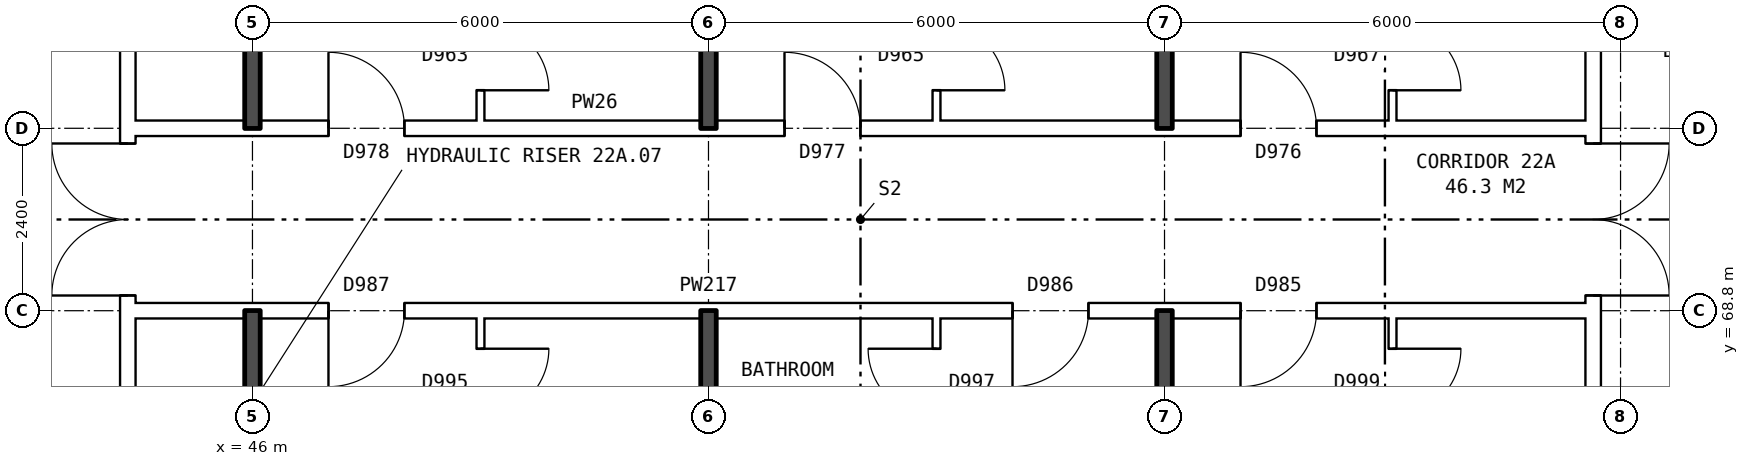
"""IFC4 building model, lengths in metres.
Left out: names, types, materials, properties, quantities, classifications, styles, units other than length and angle.
Written with IfcOpenShell. Run it as: python <this file> out.ifc"""

import sys

from ifc_helpers import new_model, si_unit, direction, frame, frame_2d, origin, place, context, subcontext, project, spatial, rectangle, extrude, element, fill, save


model = new_model("IFC4")
c1 = context("Model", 3, precision=1e-05, world=origin(), true_north=direction((0.0, 1.0)))
c2 = subcontext(c1, "Body", "Model", "MODEL_VIEW")
j1 = project(units=[si_unit("LENGTHUNIT", "METRE"), si_unit("PLANEANGLEUNIT", "RADIAN")], contexts=[c1])
p1 = place(None, origin())
s1 = spatial("IfcSite", under=j1, at=p1, CompositionType="ELEMENT")
p2 = place(p1, origin())
s2 = spatial("IfcBuilding", under=s1, at=p2, CompositionType="ELEMENT")
p3 = place(p2, frame((0.0, 0.0, 80.9)))
s3 = spatial("IfcBuildingStorey", under=s2, at=p3, CompositionType="ELEMENT", Elevation=80.9)
p4 = place(p3, frame((63.64, 63.9, 0.0), z_axis=(0.0, 0.0, 1.0), x_axis=(0.0, 1.0, 0.0)))
e1 = element("IfcWall", 1, at=p4, inside=s3, PredefinedType="PARTITIONING", context=c2, shape_type="SweptSolid", body=[
    extrude(rectangle(XDim=12.2, YDim=0.2, at=frame_2d((6.1, 0.0))), origin(), (0.0, 0.0, 1.0), 2.85),
])
p5 = place(p4, frame((5.1, 0.0, 0.0)))
e2 = element("IfcOpeningElement", 2, at=p5, cuts=e1, PredefinedType="OPENING", context=c2, shape_type="SweptSolid", body=[
    extrude(rectangle(XDim=2.0, YDim=2.1, at=frame_2d((1.0, 1.05))), frame((0.0, 0.11, 0.0), z_axis=(0.0, -1.0, 0.0), x_axis=(1.0, 0.0, 0.0)), (0.0, 0.0, 1.0), 0.22),
])
p6 = place(p3, frame((44.36, 63.9, 0.0), z_axis=(0.0, 0.0, 1.0), x_axis=(0.0, 1.0, 0.0)))
e3 = element("IfcWall", 3, at=p6, inside=s3, PredefinedType="PARTITIONING", context=c2, shape_type="SweptSolid", body=[
    extrude(rectangle(XDim=12.2, YDim=0.2, at=frame_2d((6.1, 0.0))), origin(), (0.0, 0.0, 1.0), 2.85),
])
p7 = place(p6, frame((5.1, 0.0, 0.0)))
e4 = element("IfcOpeningElement", 4, at=p7, cuts=e3, PredefinedType="OPENING", context=c2, shape_type="SweptSolid", body=[
    extrude(rectangle(XDim=2.0, YDim=2.1, at=frame_2d((1.0, 1.05))), frame((0.0, 0.11, 0.0), z_axis=(0.0, -1.0, 0.0), x_axis=(1.0, 0.0, 0.0)), (0.0, 0.0, 1.0), 0.22),
])
p8 = place(p3, frame((44.36, 68.8, 0.0), z_axis=(0.0, 0.0, 1.0), x_axis=(1.0, 0.0, 0.0)))
e5 = element("IfcWall", 5, at=p8, inside=s3, PredefinedType="PARTITIONING", context=c2, shape_type="SweptSolid", body=[
    extrude(rectangle(XDim=19.28, YDim=0.2, at=frame_2d((9.64, 0.0))), origin(), (0.0, 0.0, 1.0), 2.85),
])
p9 = place(p8, frame((14.64, 0.0, 0.0)))
e6 = element("IfcOpeningElement", 6, at=p9, cuts=e5, PredefinedType="OPENING", context=c2, shape_type="SweptSolid", body=[
    extrude(rectangle(XDim=1.0, YDim=2.1, at=frame_2d((0.5, 1.05))), frame((0.0, 0.11, 0.0), z_axis=(0.0, -1.0, 0.0), x_axis=(1.0, 0.0, 0.0)), (0.0, 0.0, 1.0), 0.22),
])
p10 = place(p8, frame((11.64, 0.0, 0.0)))
e7 = element("IfcOpeningElement", 7, at=p10, cuts=e5, PredefinedType="OPENING", context=c2, shape_type="SweptSolid", body=[
    extrude(rectangle(XDim=1.0, YDim=2.1, at=frame_2d((0.5, 1.05))), frame((0.0, 0.11, 0.0), z_axis=(0.0, -1.0, 0.0), x_axis=(1.0, 0.0, 0.0)), (0.0, 0.0, 1.0), 0.22),
])
p11 = place(p8, frame((2.64, 0.0, 0.0)))
e8 = element("IfcOpeningElement", 8, at=p11, cuts=e5, PredefinedType="OPENING", context=c2, shape_type="SweptSolid", body=[
    extrude(rectangle(XDim=1.0, YDim=2.1, at=frame_2d((0.5, 1.05))), frame((0.0, 0.11, 0.0), z_axis=(0.0, -1.0, 0.0), x_axis=(1.0, 0.0, 0.0)), (0.0, 0.0, 1.0), 0.22),
])
p12 = place(p3, frame((44.36, 71.2, 0.0), z_axis=(0.0, 0.0, 1.0), x_axis=(1.0, 0.0, 0.0)))
e9 = element("IfcWall", 9, at=p12, inside=s3, PredefinedType="PARTITIONING", context=c2, shape_type="SweptSolid", body=[
    extrude(rectangle(XDim=19.28, YDim=0.2, at=frame_2d((9.64, 0.0))), origin(), (0.0, 0.0, 1.0), 2.85),
])
p13 = place(p12, frame((14.64, 0.0, 0.0)))
e10 = element("IfcOpeningElement", 10, at=p13, cuts=e9, PredefinedType="OPENING", context=c2, shape_type="SweptSolid", body=[
    extrude(rectangle(XDim=1.0, YDim=2.1, at=frame_2d((0.5, 1.05))), frame((0.0, 0.11, 0.0), z_axis=(0.0, -1.0, 0.0), x_axis=(1.0, 0.0, 0.0)), (0.0, 0.0, 1.0), 0.22),
])
p14 = place(p12, frame((8.64, 0.0, 0.0)))
e11 = element("IfcOpeningElement", 11, at=p14, cuts=e9, PredefinedType="OPENING", context=c2, shape_type="SweptSolid", body=[
    extrude(rectangle(XDim=1.0, YDim=2.1, at=frame_2d((0.5, 1.05))), frame((0.0, 0.11, 0.0), z_axis=(0.0, -1.0, 0.0), x_axis=(1.0, 0.0, 0.0)), (0.0, 0.0, 1.0), 0.22),
])
p15 = place(p12, frame((2.64, 0.0, 0.0)))
e12 = element("IfcOpeningElement", 12, at=p15, cuts=e9, PredefinedType="OPENING", context=c2, shape_type="SweptSolid", body=[
    extrude(rectangle(XDim=1.0, YDim=2.1, at=frame_2d((0.5, 1.05))), frame((0.0, 0.11, 0.0), z_axis=(0.0, -1.0, 0.0), x_axis=(1.0, 0.0, 0.0)), (0.0, 0.0, 1.0), 0.22),
])
for number, where, z_axis, x_axis in (
    (13, (46.0, 63.8, 0.0), (0.0, 0.0, 1.0), (0.0, 1.0, 0.0)),
    (14, (46.0, 71.2, 0.0), (0.0, 0.0, 1.0), (0.0, 1.0, 0.0)),
):
    element("IfcWall", number, at=place(p3, frame(where, z_axis=z_axis, x_axis=x_axis)), inside=s3, PredefinedType="SOLIDWALL", context=c2, shape_type="SweptSolid", body=[
        extrude(rectangle(XDim=5.0, YDim=0.2, at=frame_2d((2.5, 0.0))), origin(), (0.0, 0.0, 1.0), 2.85),
    ])
p16 = place(p3, frame((49.0, 54.36, 0.0), z_axis=(0.0, 0.0, 1.0), x_axis=(0.0, 1.0, 0.0)))
e15 = element("IfcWall", 15, at=p16, inside=s3, PredefinedType="PARTITIONING", context=c2, shape_type="SweptSolid", body=[
    extrude(rectangle(XDim=14.34, YDim=0.1, at=frame_2d((7.17, 0.0))), origin(), (0.0, 0.0, 1.0), 2.85),
])
p17 = place(p16, frame((5.5, 0.0, 0.0)))
e16 = element("IfcOpeningElement", 16, at=p17, cuts=e15, PredefinedType="OPENING", context=c2, shape_type="SweptSolid", body=[
    extrude(rectangle(XDim=0.9, YDim=2.1, at=frame_2d((0.45, 1.05))), frame((0.0, 0.06, 0.0), z_axis=(0.0, -1.0, 0.0), x_axis=(1.0, 0.0, 0.0)), (0.0, 0.0, 1.0), 0.12),
])
p18 = place(p16, frame((13.04, 0.0, 0.0)))
e17 = element("IfcOpeningElement", 17, at=p18, cuts=e15, PredefinedType="OPENING", context=c2, shape_type="SweptSolid", body=[
    extrude(rectangle(XDim=0.9, YDim=2.1, at=frame_2d((0.45, 1.05))), frame((0.0, 0.06, 0.0), z_axis=(0.0, -1.0, 0.0), x_axis=(1.0, 0.0, 0.0)), (0.0, 0.0, 1.0), 0.12),
])
p19 = place(p3, frame((49.0, 71.3, 0.0), z_axis=(0.0, 0.0, 1.0), x_axis=(0.0, 1.0, 0.0)))
e18 = element("IfcWall", 18, at=p19, inside=s3, PredefinedType="PARTITIONING", context=c2, shape_type="SweptSolid", body=[
    extrude(rectangle(XDim=14.34, YDim=0.1, at=frame_2d((7.17, 0.0))), origin(), (0.0, 0.0, 1.0), 2.85),
])
p20 = place(p19, frame((7.94, 0.0, 0.0)))
e19 = element("IfcOpeningElement", 19, at=p20, cuts=e18, PredefinedType="OPENING", context=c2, shape_type="SweptSolid", body=[
    extrude(rectangle(XDim=0.9, YDim=2.1, at=frame_2d((0.45, 1.05))), frame((0.0, 0.06, 0.0), z_axis=(0.0, -1.0, 0.0), x_axis=(1.0, 0.0, 0.0)), (0.0, 0.0, 1.0), 0.12),
])
p21 = place(p19, frame((0.4, 0.0, 0.0)))
e20 = element("IfcOpeningElement", 20, at=p21, cuts=e18, PredefinedType="OPENING", context=c2, shape_type="SweptSolid", body=[
    extrude(rectangle(XDim=0.9, YDim=2.1, at=frame_2d((0.45, 1.05))), frame((0.0, 0.06, 0.0), z_axis=(0.0, -1.0, 0.0), x_axis=(1.0, 0.0, 0.0)), (0.0, 0.0, 1.0), 0.12),
])
for number, where, z_axis, x_axis in (
    (21, (52.0, 54.36, 0.0), (0.0, 0.0, 1.0), (0.0, 1.0, 0.0)),
    (22, (52.0, 71.2, 0.0), (0.0, 0.0, 1.0), (0.0, 1.0, 0.0)),
):
    element("IfcWall", number, at=place(p3, frame(where, z_axis=z_axis, x_axis=x_axis)), inside=s3, PredefinedType="SOLIDWALL", context=c2, shape_type="SweptSolid", body=[
        extrude(rectangle(XDim=14.44, YDim=0.2, at=frame_2d((7.22, 0.0))), origin(), (0.0, 0.0, 1.0), 2.85),
    ])
p22 = place(p3, frame((55.0, 54.36, 0.0), z_axis=(0.0, 0.0, 1.0), x_axis=(0.0, 1.0, 0.0)))
e23 = element("IfcWall", 23, at=p22, inside=s3, PredefinedType="PARTITIONING", context=c2, shape_type="SweptSolid", body=[
    extrude(rectangle(XDim=14.34, YDim=0.1, at=frame_2d((7.17, 0.0))), origin(), (0.0, 0.0, 1.0), 2.85),
])
p23 = place(p22, frame((6.7, 0.0, 0.0)))
e24 = element("IfcOpeningElement", 24, at=p23, cuts=e23, PredefinedType="OPENING", context=c2, shape_type="SweptSolid", body=[
    extrude(rectangle(XDim=0.9, YDim=2.1, at=frame_2d((0.45, 1.05))), frame((0.0, 0.06, 0.0), z_axis=(0.0, -1.0, 0.0), x_axis=(1.0, 0.0, 0.0)), (0.0, 0.0, 1.0), 0.12),
])
p24 = place(p22, frame((13.04, 0.0, 0.0)))
e25 = element("IfcOpeningElement", 25, at=p24, cuts=e23, PredefinedType="OPENING", context=c2, shape_type="SweptSolid", body=[
    extrude(rectangle(XDim=0.9, YDim=2.1, at=frame_2d((0.45, 1.05))), frame((0.0, 0.06, 0.0), z_axis=(0.0, -1.0, 0.0), x_axis=(1.0, 0.0, 0.0)), (0.0, 0.0, 1.0), 0.12),
])
p25 = place(p3, frame((55.0, 71.3, 0.0), z_axis=(0.0, 0.0, 1.0), x_axis=(0.0, 1.0, 0.0)))
e26 = element("IfcWall", 26, at=p25, inside=s3, PredefinedType="PARTITIONING", context=c2, shape_type="SweptSolid", body=[
    extrude(rectangle(XDim=14.34, YDim=0.1, at=frame_2d((7.17, 0.0))), origin(), (0.0, 0.0, 1.0), 2.85),
])
p26 = place(p25, frame((6.74, 0.0, 0.0)))
e27 = element("IfcOpeningElement", 27, at=p26, cuts=e26, PredefinedType="OPENING", context=c2, shape_type="SweptSolid", body=[
    extrude(rectangle(XDim=0.9, YDim=2.1, at=frame_2d((0.45, 1.05))), frame((0.0, 0.06, 0.0), z_axis=(0.0, -1.0, 0.0), x_axis=(1.0, 0.0, 0.0)), (0.0, 0.0, 1.0), 0.12),
])
p27 = place(p25, frame((0.4, 0.0, 0.0)))
e28 = element("IfcOpeningElement", 28, at=p27, cuts=e26, PredefinedType="OPENING", context=c2, shape_type="SweptSolid", body=[
    extrude(rectangle(XDim=0.9, YDim=2.1, at=frame_2d((0.45, 1.05))), frame((0.0, 0.06, 0.0), z_axis=(0.0, -1.0, 0.0), x_axis=(1.0, 0.0, 0.0)), (0.0, 0.0, 1.0), 0.12),
])
for number, where, z_axis, x_axis in (
    (29, (58.0, 54.36, 0.0), (0.0, 0.0, 1.0), (0.0, 1.0, 0.0)),
    (30, (58.0, 71.2, 0.0), (0.0, 0.0, 1.0), (0.0, 1.0, 0.0)),
):
    element("IfcWall", number, at=place(p3, frame(where, z_axis=z_axis, x_axis=x_axis)), inside=s3, PredefinedType="SOLIDWALL", context=c2, shape_type="SweptSolid", body=[
        extrude(rectangle(XDim=14.44, YDim=0.2, at=frame_2d((7.22, 0.0))), origin(), (0.0, 0.0, 1.0), 2.85),
    ])
p28 = place(p3, frame((61.0, 54.36, 0.0), z_axis=(0.0, 0.0, 1.0), x_axis=(0.0, 1.0, 0.0)))
e31 = element("IfcWall", 31, at=p28, inside=s3, PredefinedType="PARTITIONING", context=c2, shape_type="SweptSolid", body=[
    extrude(rectangle(XDim=14.34, YDim=0.1, at=frame_2d((7.17, 0.0))), origin(), (0.0, 0.0, 1.0), 2.85),
])
p29 = place(p28, frame((7.7, 0.0, 0.0)))
e32 = element("IfcOpeningElement", 32, at=p29, cuts=e31, PredefinedType="OPENING", context=c2, shape_type="SweptSolid", body=[
    extrude(rectangle(XDim=0.9, YDim=2.1, at=frame_2d((0.45, 1.05))), frame((0.0, 0.06, 0.0), z_axis=(0.0, -1.0, 0.0), x_axis=(1.0, 0.0, 0.0)), (0.0, 0.0, 1.0), 0.12),
])
p30 = place(p28, frame((13.04, 0.0, 0.0)))
e33 = element("IfcOpeningElement", 33, at=p30, cuts=e31, PredefinedType="OPENING", context=c2, shape_type="SweptSolid", body=[
    extrude(rectangle(XDim=0.9, YDim=2.1, at=frame_2d((0.45, 1.05))), frame((0.0, 0.06, 0.0), z_axis=(0.0, -1.0, 0.0), x_axis=(1.0, 0.0, 0.0)), (0.0, 0.0, 1.0), 0.12),
])
p31 = place(p3, frame((61.0, 71.3, 0.0), z_axis=(0.0, 0.0, 1.0), x_axis=(0.0, 1.0, 0.0)))
e34 = element("IfcWall", 34, at=p31, inside=s3, PredefinedType="PARTITIONING", context=c2, shape_type="SweptSolid", body=[
    extrude(rectangle(XDim=14.34, YDim=0.1, at=frame_2d((7.17, 0.0))), origin(), (0.0, 0.0, 1.0), 2.85),
])
p32 = place(p31, frame((7.94, 0.0, 0.0)))
e35 = element("IfcOpeningElement", 35, at=p32, cuts=e34, PredefinedType="OPENING", context=c2, shape_type="SweptSolid", body=[
    extrude(rectangle(XDim=0.9, YDim=2.1, at=frame_2d((0.45, 1.05))), frame((0.0, 0.06, 0.0), z_axis=(0.0, -1.0, 0.0), x_axis=(1.0, 0.0, 0.0)), (0.0, 0.0, 1.0), 0.12),
])
p33 = place(p31, frame((0.4, 0.0, 0.0)))
e36 = element("IfcOpeningElement", 36, at=p33, cuts=e34, PredefinedType="OPENING", context=c2, shape_type="SweptSolid", body=[
    extrude(rectangle(XDim=0.9, YDim=2.1, at=frame_2d((0.45, 1.05))), frame((0.0, 0.06, 0.0), z_axis=(0.0, -1.0, 0.0), x_axis=(1.0, 0.0, 0.0)), (0.0, 0.0, 1.0), 0.12),
])
p34 = place(p5, frame((2.0, 0.0, 0.0), z_axis=(0.0, 0.0, 1.0), x_axis=(-1.0, 0.0, 0.0)))
e37 = element("IfcDoor", 37, at=p34, inside=s3, OperationType="DOUBLE_DOOR_SINGLE_SWING", PredefinedType="DOOR", context=c2, shape_type="SweptSolid", body=[
    extrude(rectangle(XDim=2.0, YDim=2.1, at=frame_2d((1.0, 1.05))), frame((0.0, 0.025, 0.0), z_axis=(0.0, -1.0, 0.0), x_axis=(1.0, 0.0, 0.0)), (0.0, 0.0, 1.0), 0.05),
])
fill(e2, e37)
p35 = place(p7, origin())
e38 = element("IfcDoor", 38, at=p35, inside=s3, OperationType="DOUBLE_DOOR_SINGLE_SWING", PredefinedType="DOOR", context=c2, shape_type="SweptSolid", body=[
    extrude(rectangle(XDim=2.0, YDim=2.1, at=frame_2d((1.0, 1.05))), frame((0.0, 0.025, 0.0), z_axis=(0.0, -1.0, 0.0), x_axis=(1.0, 0.0, 0.0)), (0.0, 0.0, 1.0), 0.05),
])
fill(e4, e38)
p36 = place(p9, frame((1.0, 0.0, 0.0), z_axis=(0.0, 0.0, 1.0), x_axis=(-1.0, 0.0, 0.0)))
e39 = element("IfcDoor", 39, at=p36, inside=s3, OperationType="SINGLE_SWING_RIGHT", PredefinedType="DOOR", context=c2, shape_type="SweptSolid", body=[
    extrude(rectangle(XDim=1.0, YDim=2.1, at=frame_2d((0.5, 1.05))), frame((0.0, 0.025, 0.0), z_axis=(0.0, -1.0, 0.0), x_axis=(1.0, 0.0, 0.0)), (0.0, 0.0, 1.0), 0.05),
])
fill(e6, e39)
p37 = place(p30, frame((0.9, 0.0, 0.0), z_axis=(0.0, 0.0, 1.0), x_axis=(-1.0, 0.0, 0.0)))
e40 = element("IfcDoor", 40, at=p37, inside=s3, OperationType="SINGLE_SWING_LEFT", PredefinedType="DOOR", context=c2, shape_type="SweptSolid", body=[
    extrude(rectangle(XDim=0.9, YDim=2.1, at=frame_2d((0.45, 1.05))), frame((0.0, 0.025, 0.0), z_axis=(0.0, -1.0, 0.0), x_axis=(1.0, 0.0, 0.0)), (0.0, 0.0, 1.0), 0.05),
])
fill(e33, e40)
p38 = place(p10, frame((1.0, 0.0, 0.0), z_axis=(0.0, 0.0, 1.0), x_axis=(-1.0, 0.0, 0.0)))
e41 = element("IfcDoor", 41, at=p38, inside=s3, OperationType="SINGLE_SWING_RIGHT", PredefinedType="DOOR", context=c2, shape_type="SweptSolid", body=[
    extrude(rectangle(XDim=1.0, YDim=2.1, at=frame_2d((0.5, 1.05))), frame((0.0, 0.025, 0.0), z_axis=(0.0, -1.0, 0.0), x_axis=(1.0, 0.0, 0.0)), (0.0, 0.0, 1.0), 0.05),
])
fill(e7, e41)
p39 = place(p24, origin())
e42 = element("IfcDoor", 42, at=p39, inside=s3, OperationType="SINGLE_SWING_RIGHT", PredefinedType="DOOR", context=c2, shape_type="SweptSolid", body=[
    extrude(rectangle(XDim=0.9, YDim=2.1, at=frame_2d((0.45, 1.05))), frame((0.0, 0.025, 0.0), z_axis=(0.0, -1.0, 0.0), x_axis=(1.0, 0.0, 0.0)), (0.0, 0.0, 1.0), 0.05),
])
fill(e25, e42)
p40 = place(p11, frame((1.0, 0.0, 0.0), z_axis=(0.0, 0.0, 1.0), x_axis=(-1.0, 0.0, 0.0)))
e43 = element("IfcDoor", 43, at=p40, inside=s3, OperationType="SINGLE_SWING_RIGHT", PredefinedType="DOOR", context=c2, shape_type="SweptSolid", body=[
    extrude(rectangle(XDim=1.0, YDim=2.1, at=frame_2d((0.5, 1.05))), frame((0.0, 0.025, 0.0), z_axis=(0.0, -1.0, 0.0), x_axis=(1.0, 0.0, 0.0)), (0.0, 0.0, 1.0), 0.05),
])
fill(e8, e43)
p41 = place(p18, frame((0.9, 0.0, 0.0), z_axis=(0.0, 0.0, 1.0), x_axis=(-1.0, 0.0, 0.0)))
e44 = element("IfcDoor", 44, at=p41, inside=s3, OperationType="SINGLE_SWING_LEFT", PredefinedType="DOOR", context=c2, shape_type="SweptSolid", body=[
    extrude(rectangle(XDim=0.9, YDim=2.1, at=frame_2d((0.45, 1.05))), frame((0.0, 0.025, 0.0), z_axis=(0.0, -1.0, 0.0), x_axis=(1.0, 0.0, 0.0)), (0.0, 0.0, 1.0), 0.05),
])
fill(e17, e44)
p42 = place(p13, origin())
e45 = element("IfcDoor", 45, at=p42, inside=s3, OperationType="SINGLE_SWING_LEFT", PredefinedType="DOOR", context=c2, shape_type="SweptSolid", body=[
    extrude(rectangle(XDim=1.0, YDim=2.1, at=frame_2d((0.5, 1.05))), frame((0.0, 0.025, 0.0), z_axis=(0.0, -1.0, 0.0), x_axis=(1.0, 0.0, 0.0)), (0.0, 0.0, 1.0), 0.05),
])
fill(e10, e45)
p43 = place(p33, frame((0.9, 0.0, 0.0), z_axis=(0.0, 0.0, 1.0), x_axis=(-1.0, 0.0, 0.0)))
e46 = element("IfcDoor", 46, at=p43, inside=s3, OperationType="SINGLE_SWING_RIGHT", PredefinedType="DOOR", context=c2, shape_type="SweptSolid", body=[
    extrude(rectangle(XDim=0.9, YDim=2.1, at=frame_2d((0.45, 1.05))), frame((0.0, 0.025, 0.0), z_axis=(0.0, -1.0, 0.0), x_axis=(1.0, 0.0, 0.0)), (0.0, 0.0, 1.0), 0.05),
])
fill(e36, e46)
p44 = place(p14, origin())
e47 = element("IfcDoor", 47, at=p44, inside=s3, OperationType="SINGLE_SWING_LEFT", PredefinedType="DOOR", context=c2, shape_type="SweptSolid", body=[
    extrude(rectangle(XDim=1.0, YDim=2.1, at=frame_2d((0.5, 1.05))), frame((0.0, 0.025, 0.0), z_axis=(0.0, -1.0, 0.0), x_axis=(1.0, 0.0, 0.0)), (0.0, 0.0, 1.0), 0.05),
])
fill(e11, e47)
p45 = place(p27, frame((0.9, 0.0, 0.0), z_axis=(0.0, 0.0, 1.0), x_axis=(-1.0, 0.0, 0.0)))
e48 = element("IfcDoor", 48, at=p45, inside=s3, OperationType="SINGLE_SWING_RIGHT", PredefinedType="DOOR", context=c2, shape_type="SweptSolid", body=[
    extrude(rectangle(XDim=0.9, YDim=2.1, at=frame_2d((0.45, 1.05))), frame((0.0, 0.025, 0.0), z_axis=(0.0, -1.0, 0.0), x_axis=(1.0, 0.0, 0.0)), (0.0, 0.0, 1.0), 0.05),
])
fill(e28, e48)
p46 = place(p15, origin())
e49 = element("IfcDoor", 49, at=p46, inside=s3, OperationType="SINGLE_SWING_LEFT", PredefinedType="DOOR", context=c2, shape_type="SweptSolid", body=[
    extrude(rectangle(XDim=1.0, YDim=2.1, at=frame_2d((0.5, 1.05))), frame((0.0, 0.025, 0.0), z_axis=(0.0, -1.0, 0.0), x_axis=(1.0, 0.0, 0.0)), (0.0, 0.0, 1.0), 0.05),
])
fill(e12, e49)
p47 = place(p21, frame((0.9, 0.0, 0.0), z_axis=(0.0, 0.0, 1.0), x_axis=(-1.0, 0.0, 0.0)))
e50 = element("IfcDoor", 50, at=p47, inside=s3, OperationType="SINGLE_SWING_RIGHT", PredefinedType="DOOR", context=c2, shape_type="SweptSolid", body=[
    extrude(rectangle(XDim=0.9, YDim=2.1, at=frame_2d((0.45, 1.05))), frame((0.0, 0.025, 0.0), z_axis=(0.0, -1.0, 0.0), x_axis=(1.0, 0.0, 0.0)), (0.0, 0.0, 1.0), 0.05),
])
fill(e20, e50)
save(model, sys.argv[1])
